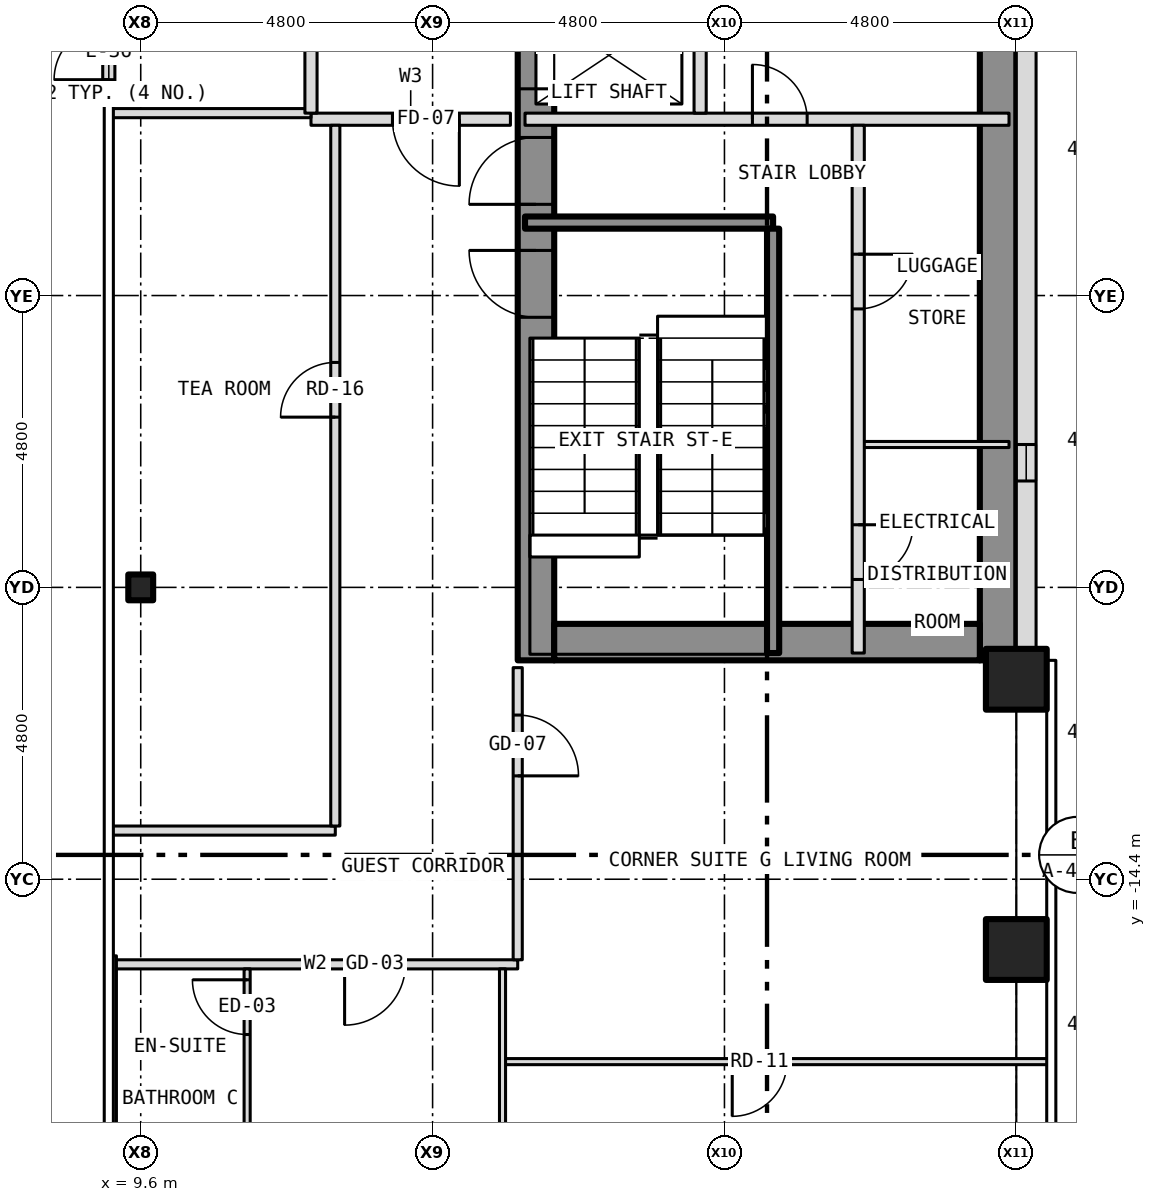
"""IFC4 building model, lengths in metres.
Left out: names, types, materials, properties, quantities, classifications, styles, units other than length and angle.
Written with IfcOpenShell. Run it as: python <this file> out.ifc"""

import sys

from ifc_helpers import new_model, si_unit, direction, frame, frame_2d, origin, origin_2d, place, context, subcontext, project, spatial, rectangle, hollow_rectangle, i_section, extrude, element, fill, save


model = new_model("IFC4")
c1 = context("Model", 3, precision=1e-05, world=origin(), true_north=direction((0.0, 1.0)))
c2 = subcontext(c1, "Body", "Model", "MODEL_VIEW")
j1 = project(units=[si_unit("LENGTHUNIT", "METRE"), si_unit("PLANEANGLEUNIT", "RADIAN")], contexts=[c1])
p1 = place(None, origin())
s1 = spatial("IfcSite", under=j1, at=p1, CompositionType="ELEMENT")
p2 = place(p1, origin())
s2 = spatial("IfcBuilding", under=s1, at=p2, CompositionType="ELEMENT")
p3 = place(p2, frame((0.0, 0.0, 77.5)))
s3 = spatial("IfcBuildingStorey", under=s2, at=p3, CompositionType="ELEMENT", Elevation=77.5)
for number, where, z_axis, x_axis in (
    (1, (24.0, -15.556, -0.15), (0.0, 0.0, 1.0), (1.0, 0.0, 0.0)),
    (2, (24.0, -11.111, -0.15), (0.0, 0.0, 1.0), (1.0, 0.0, 0.0)),
):
    element("IfcColumn", number, at=place(p3, frame(where, z_axis=z_axis, x_axis=x_axis)), inside=s3, PredefinedType="COLUMN", context=c2, shape_type="SweptSolid", body=[
        extrude(hollow_rectangle(XDim=1.0, YDim=1.0, WallThickness=0.06, at=origin_2d()), origin(), (0.0, 0.0, 1.0), 3.5),
    ])
p4 = place(p3, frame((9.6, -9.6, -0.15), z_axis=(0.0, 0.0, 1.0), x_axis=(1.0, 0.0, 0.0)))
e3 = element("IfcColumn", 3, at=p4, inside=s3, PredefinedType="COLUMN", context=c2, shape_type="SweptSolid", body=[
    extrude(i_section(OverallWidth=0.409, OverallDepth=0.424, WebThickness=0.033, FlangeThickness=0.052, at=origin_2d()), origin(), (0.0, 0.0, 1.0), 3.5),
])
p5 = place(p3, frame((16.1, -10.8, 0.0), z_axis=(0.0, 0.0, 1.0), x_axis=(0.0, 1.0, 0.0)))
e4 = element("IfcWall", 4, at=p5, inside=s3, PredefinedType="SHEAR", context=c2, shape_type="SweptSolid", body=[
    extrude(rectangle(XDim=21.6, YDim=0.6, at=frame_2d((10.8, 0.0))), origin(), (0.0, 0.0, 1.0), 3.25),
])
p6 = place(p5, frame((9.4, 0.0, 0.0)))
e5 = element("IfcOpeningElement", 5, at=p6, cuts=e4, PredefinedType="OPENING", context=c2, shape_type="SweptSolid", body=[
    extrude(rectangle(XDim=1.1, YDim=2.1, at=frame_2d((0.55, 1.05))), frame((0.0, 0.312, 0.0), z_axis=(0.0, -1.0, 0.0), x_axis=(1.0, 0.0, 0.0)), (0.0, 0.0, 1.0), 0.624),
])
p7 = place(p5, frame((11.5, 0.0, 0.0)))
e6 = element("IfcOpeningElement", 6, at=p7, cuts=e4, PredefinedType="OPENING", context=c2, shape_type="SweptSolid", body=[
    extrude(rectangle(XDim=1.1, YDim=2.1, at=frame_2d((0.55, 1.05))), frame((0.0, 0.312, 0.0), z_axis=(0.0, -1.0, 0.0), x_axis=(1.0, 0.0, 0.0)), (0.0, 0.0, 1.0), 0.624),
])
p8 = place(p5, frame((13.6, 0.0, 0.0)))
e7 = element("IfcOpeningElement", 7, at=p8, cuts=e4, PredefinedType="OPENING", context=c2, shape_type="SweptSolid", body=[
    extrude(rectangle(XDim=1.1, YDim=2.1, at=frame_2d((0.55, 1.05))), frame((0.0, 0.312, 0.0), z_axis=(0.0, -1.0, 0.0), x_axis=(1.0, 0.0, 0.0)), (0.0, 0.0, 1.0), 0.624),
])
p9 = place(p5, frame((15.7, 0.0, 0.0)))
e8 = element("IfcOpeningElement", 8, at=p9, cuts=e4, PredefinedType="OPENING", context=c2, shape_type="SweptSolid", body=[
    extrude(rectangle(XDim=1.1, YDim=2.1, at=frame_2d((0.55, 1.05))), frame((0.0, 0.312, 0.0), z_axis=(0.0, -1.0, 0.0), x_axis=(1.0, 0.0, 0.0)), (0.0, 0.0, 1.0), 0.624),
])
p10 = place(p5, frame((17.8, 0.0, 0.0)))
e9 = element("IfcOpeningElement", 9, at=p10, cuts=e4, PredefinedType="OPENING", context=c2, shape_type="SweptSolid", body=[
    extrude(rectangle(XDim=1.1, YDim=2.1, at=frame_2d((0.55, 1.05))), frame((0.0, 0.312, 0.0), z_axis=(0.0, -1.0, 0.0), x_axis=(1.0, 0.0, 0.0)), (0.0, 0.0, 1.0), 0.624),
])
p11 = place(p5, frame((5.642, 0.0, 0.0)))
e10 = element("IfcOpeningElement", 10, at=p11, cuts=e4, PredefinedType="OPENING", context=c2, shape_type="SweptSolid", body=[
    extrude(rectangle(XDim=1.1, YDim=2.1, at=frame_2d((0.55, 1.05))), frame((0.0, 0.312, 0.0), z_axis=(0.0, -1.0, 0.0), x_axis=(1.0, 0.0, 0.0)), (0.0, 0.0, 1.0), 0.624),
])
p12 = place(p5, frame((7.5, 0.0, 0.0)))
e11 = element("IfcOpeningElement", 11, at=p12, cuts=e4, PredefinedType="OPENING", context=c2, shape_type="SweptSolid", body=[
    extrude(rectangle(XDim=1.1, YDim=2.1, at=frame_2d((0.55, 1.05))), frame((0.0, 0.312, 0.0), z_axis=(0.0, -1.0, 0.0), x_axis=(1.0, 0.0, 0.0)), (0.0, 0.0, 1.0), 0.624),
])
p13 = place(p3, frame((23.7, -10.8, 0.0), z_axis=(0.0, 0.0, 1.0), x_axis=(0.0, 1.0, 0.0)))
e12 = element("IfcWall", 12, at=p13, inside=s3, PredefinedType="SHEAR", context=c2, shape_type="SweptSolid", body=[
    extrude(rectangle(XDim=21.6, YDim=0.6, at=frame_2d((10.8, 0.0))), origin(), (0.0, 0.0, 1.0), 3.25),
])
p14 = place(p3, frame((16.4, -10.5, 0.0), z_axis=(0.0, 0.0, 1.0), x_axis=(1.0, 0.0, 0.0)))
e13 = element("IfcWall", 13, at=p14, inside=s3, PredefinedType="SHEAR", context=c2, shape_type="SweptSolid", body=[
    extrude(rectangle(XDim=7.0, YDim=0.6, at=frame_2d((3.5, 0.0))), origin(), (0.0, 0.0, 1.0), 3.25),
])
p15 = place(p3, frame((24.163, -10.8, 0.0), z_axis=(0.0, 0.0, 1.0), x_axis=(0.0, 1.0, 0.0)))
e14 = element("IfcWall", 14, at=p15, inside=s3, PredefinedType="SOLIDWALL", context=c2, shape_type="SweptSolid", body=[
    extrude(rectangle(XDim=21.6, YDim=0.325, at=frame_2d((10.8, 0.0))), origin(), (0.0, 0.0, 1.0), 3.5),
])
p16 = place(p15, frame((2.95, 0.0, 1.0)))
e15 = element("IfcOpeningElement", 15, at=p16, cuts=e14, PredefinedType="OPENING", context=c2, shape_type="SweptSolid", body=[
    extrude(rectangle(XDim=0.6, YDim=1.5, at=frame_2d((0.3, 0.75))), frame((0.0, 0.175, 0.0), z_axis=(0.0, -1.0, 0.0), x_axis=(1.0, 0.0, 0.0)), (0.0, 0.0, 1.0), 0.349),
])
p17 = place(p3, frame((9.075, -1.4, 0.0), z_axis=(0.0, 0.0, 1.0), x_axis=(0.0, 1.0, 0.0)))
e16 = element("IfcWall", 16, at=p17, inside=s3, PredefinedType="SOLIDWALL", context=c2, shape_type="SweptSolid", body=[
    extrude(rectangle(XDim=2.8, YDim=0.2, at=frame_2d((1.4, 0.0))), origin(), (0.0, 0.0, 1.0), 3.5),
])
p18 = place(p17, frame((0.15, 0.0, 0.0)))
e17 = element("IfcOpeningElement", 17, at=p18, cuts=e16, PredefinedType="OPENING", context=c2, shape_type="SweptSolid", body=[
    extrude(rectangle(XDim=0.9, YDim=2.1, at=frame_2d((0.45, 1.05))), frame((0.0, 0.112, 0.0), z_axis=(0.0, -1.0, 0.0), x_axis=(1.0, 0.0, 0.0)), (0.0, 0.0, 1.0), 0.224),
])
p19 = place(p17, frame((1.75, 0.0, 0.0)))
e18 = element("IfcOpeningElement", 18, at=p19, cuts=e16, PredefinedType="OPENING", context=c2, shape_type="SweptSolid", body=[
    extrude(rectangle(XDim=0.9, YDim=2.1, at=frame_2d((0.45, 1.05))), frame((0.0, 0.112, 0.0), z_axis=(0.0, -1.0, 0.0), x_axis=(1.0, 0.0, 0.0)), (0.0, 0.0, 1.0), 0.224),
])
p20 = place(p3, frame((15.55, -17.4, 0.0), z_axis=(0.0, 0.0, 1.0), x_axis=(1.0, 0.0, 0.0)))
e19 = element("IfcWall", 19, at=p20, inside=s3, PredefinedType="PARTITIONING", context=c2, shape_type="SweptSolid", body=[
    extrude(rectangle(XDim=8.98, YDim=0.1, at=frame_2d((4.49, 0.0))), origin(), (0.0, 0.0, 1.0), 3.35),
])
p21 = place(p20, frame((3.778, 0.0, 0.0)))
e20 = element("IfcOpeningElement", 20, at=p21, cuts=e19, PredefinedType="OPENING", context=c2, shape_type="SweptSolid", body=[
    extrude(rectangle(XDim=0.9, YDim=2.1, at=frame_2d((0.45, 1.05))), frame((0.0, 0.062, 0.0), z_axis=(0.0, -1.0, 0.0), x_axis=(1.0, 0.0, 0.0)), (0.0, 0.0, 1.0), 0.124),
])
p22 = place(p3, frame((9.15, -15.8, 0.0), z_axis=(0.0, 0.0, 1.0), x_axis=(1.0, 0.0, 0.0)))
e21 = element("IfcWall", 21, at=p22, inside=s3, PredefinedType="PARTITIONING", context=c2, shape_type="SweptSolid", body=[
    extrude(rectangle(XDim=6.65, YDim=0.15, at=frame_2d((3.325, 0.0))), origin(), (0.0, 0.0, 1.0), 3.35),
])
p23 = place(p22, frame((3.803, 0.0, 0.0)))
e22 = element("IfcOpeningElement", 22, at=p23, cuts=e21, PredefinedType="OPENING", context=c2, shape_type="SweptSolid", body=[
    extrude(rectangle(XDim=1.0, YDim=2.1, at=frame_2d((0.5, 1.05))), frame((0.0, 0.087, 0.0), z_axis=(0.0, -1.0, 0.0), x_axis=(1.0, 0.0, 0.0)), (0.0, 0.0, 1.0), 0.174),
])
p24 = place(p3, frame((9.12, -13.6, 0.0), z_axis=(0.0, 0.0, 1.0), x_axis=(1.0, 0.0, 0.0)))
e23 = element("IfcWall", 23, at=p24, inside=s3, PredefinedType="PARTITIONING", context=c2, shape_type="SweptSolid", body=[
    extrude(rectangle(XDim=3.68, YDim=0.15, at=frame_2d((1.84, 0.0))), origin(), (0.0, 0.0, 1.0), 3.35),
])
p25 = place(p3, frame((21.4, -7.25, 0.0), z_axis=(0.0, 0.0, 1.0), x_axis=(1.0, 0.0, 0.0)))
e24 = element("IfcWall", 24, at=p25, inside=s3, PredefinedType="PARTITIONING", context=c2, shape_type="SweptSolid", body=[
    extrude(rectangle(XDim=2.48, YDim=0.1, at=frame_2d((1.24, 0.0))), origin(), (0.0, 0.0, 1.0), 3.25),
])
p26 = place(p3, frame((15.92, -3.6, 0.0), z_axis=(0.0, 0.0, 1.0), x_axis=(1.0, 0.0, 0.0)))
e25 = element("IfcWall", 25, at=p26, inside=s3, PredefinedType="SHEAR", context=c2, shape_type="SweptSolid", body=[
    extrude(rectangle(XDim=4.08, YDim=0.2, at=frame_2d((2.04, 0.0))), origin(), (0.0, 0.0, 1.0), 3.25),
])
p27 = place(p3, frame((12.4, -1.9, 0.0), z_axis=(0.0, 0.0, 1.0), x_axis=(1.0, 0.0, 0.0)))
e26 = element("IfcWall", 26, at=p27, inside=s3, PredefinedType="PARTITIONING", context=c2, shape_type="SweptSolid", body=[
    extrude(rectangle(XDim=3.28, YDim=0.2, at=frame_2d((1.64, 0.0))), origin(), (0.0, 0.0, 1.0), 3.35),
])
p28 = place(p27, frame((1.34, 0.0, 0.0)))
e27 = element("IfcOpeningElement", 27, at=p28, cuts=e26, PredefinedType="OPENING", context=c2, shape_type="SweptSolid", body=[
    extrude(rectangle(XDim=1.1, YDim=2.1, at=frame_2d((0.55, 1.05))), frame((0.0, 0.112, 0.0), z_axis=(0.0, -1.0, 0.0), x_axis=(1.0, 0.0, 0.0)), (0.0, 0.0, 1.0), 0.224),
])
p29 = place(p3, frame((15.92, -1.9, 0.0), z_axis=(0.0, 0.0, 1.0), x_axis=(1.0, 0.0, 0.0)))
e28 = element("IfcWall", 28, at=p29, inside=s3, PredefinedType="PARTITIONING", context=c2, shape_type="SweptSolid", body=[
    extrude(rectangle(XDim=7.96, YDim=0.2, at=frame_2d((3.98, 0.0))), origin(), (0.0, 0.0, 1.0), 3.25),
])
p30 = place(p29, frame((3.74, 0.0, 0.0)))
e29 = element("IfcOpeningElement", 29, at=p30, cuts=e28, PredefinedType="OPENING", context=c2, shape_type="SweptSolid", body=[
    extrude(rectangle(XDim=0.9, YDim=2.1, at=frame_2d((0.45, 1.05))), frame((0.0, 0.112, 0.0), z_axis=(0.0, -1.0, 0.0), x_axis=(1.0, 0.0, 0.0)), (0.0, 0.0, 1.0), 0.224),
])
p31 = place(p3, frame((9.12, -1.8, 0.0), z_axis=(0.0, 0.0, 1.0), x_axis=(1.0, 0.0, 0.0)))
e30 = element("IfcWall", 30, at=p31, inside=s3, PredefinedType="PARTITIONING", context=c2, shape_type="SweptSolid", body=[
    extrude(rectangle(XDim=3.28, YDim=0.15, at=frame_2d((1.64, 0.0))), origin(), (0.0, 0.0, 1.0), 3.35),
])
p32 = place(p3, frame((9.15, -19.14, 0.0), z_axis=(0.0, 0.0, 1.0), x_axis=(0.0, 1.0, 0.0)))
e31 = element("IfcWall", 31, at=p32, inside=s3, PredefinedType="PARTITIONING", context=c2, shape_type="SweptSolid", body=[
    extrude(rectangle(XDim=3.48, YDim=0.1, at=frame_2d((1.74, 0.0))), origin(), (0.0, 0.0, 1.0), 2.733),
])
p33 = place(p3, frame((11.35, -18.95, 0.0), z_axis=(0.0, 0.0, 1.0), x_axis=(0.0, 1.0, 0.0)))
e32 = element("IfcWall", 32, at=p33, inside=s3, PredefinedType="PARTITIONING", context=c2, shape_type="SweptSolid", body=[
    extrude(rectangle(XDim=3.075, YDim=0.1, at=frame_2d((1.538, 0.0))), origin(), (0.0, 0.0, 1.0), 3.35),
])
p34 = place(p33, frame((1.996, 0.0, 0.0)))
e33 = element("IfcOpeningElement", 33, at=p34, cuts=e32, PredefinedType="OPENING", context=c2, shape_type="SweptSolid", body=[
    extrude(rectangle(XDim=0.9, YDim=2.1, at=frame_2d((0.45, 1.05))), frame((0.0, 0.062, 0.0), z_axis=(0.0, -1.0, 0.0), x_axis=(1.0, 0.0, 0.0)), (0.0, 0.0, 1.0), 0.124),
])
p35 = place(p3, frame((12.4, -1.8, 0.0), z_axis=(0.0, 0.0, 1.0), x_axis=(0.0, 1.0, 0.0)))
e34 = element("IfcWall", 34, at=p35, inside=s3, PredefinedType="PARTITIONING", context=c2, shape_type="SweptSolid", body=[
    extrude(rectangle(XDim=4.0, YDim=0.2, at=frame_2d((2.0, 0.0))), origin(), (0.0, 0.0, 1.0), 3.35),
])
p36 = place(p35, frame((1.25, 0.0, 0.0)))
e35 = element("IfcOpeningElement", 35, at=p36, cuts=e34, PredefinedType="OPENING", context=c2, shape_type="SweptSolid", body=[
    extrude(rectangle(XDim=1.1, YDim=2.1, at=frame_2d((0.55, 1.05))), frame((0.0, 0.112, 0.0), z_axis=(0.0, -1.0, 0.0), x_axis=(1.0, 0.0, 0.0)), (0.0, 0.0, 1.0), 0.224),
])
p37 = place(p3, frame((12.8, -13.525, 0.0), z_axis=(0.0, 0.0, 1.0), x_axis=(0.0, 1.0, 0.0)))
e36 = element("IfcWall", 36, at=p37, inside=s3, PredefinedType="PARTITIONING", context=c2, shape_type="SweptSolid", body=[
    extrude(rectangle(XDim=11.525, YDim=0.15, at=frame_2d((5.762, 0.0))), origin(), (0.0, 0.0, 1.0), 3.35),
])
p38 = place(p37, frame((6.725, 0.0, 0.0)))
e37 = element("IfcOpeningElement", 37, at=p38, cuts=e36, PredefinedType="OPENING", context=c2, shape_type="SweptSolid", body=[
    extrude(rectangle(XDim=0.9, YDim=2.1, at=frame_2d((0.45, 1.05))), frame((0.0, 0.087, 0.0), z_axis=(0.0, -1.0, 0.0), x_axis=(1.0, 0.0, 0.0)), (0.0, 0.0, 1.0), 0.174),
])
p39 = place(p3, frame((15.55, -23.88, 0.0), z_axis=(0.0, 0.0, 1.0), x_axis=(0.0, 1.0, 0.0)))
e38 = element("IfcWall", 38, at=p39, inside=s3, PredefinedType="PARTITIONING", context=c2, shape_type="SweptSolid", body=[
    extrude(rectangle(XDim=8.005, YDim=0.1, at=frame_2d((4.002, 0.0))), origin(), (0.0, 0.0, 1.0), 3.35),
])
p40 = place(p3, frame((15.8, -15.725, 0.0), z_axis=(0.0, 0.0, 1.0), x_axis=(0.0, 1.0, 0.0)))
e39 = element("IfcWall", 39, at=p40, inside=s3, PredefinedType="PARTITIONING", context=c2, shape_type="SweptSolid", body=[
    extrude(rectangle(XDim=4.805, YDim=0.15, at=frame_2d((2.403, 0.0))), origin(), (0.0, 0.0, 1.0), 3.35),
])
p41 = place(p40, frame((3.025, 0.0, 0.0)))
e40 = element("IfcOpeningElement", 40, at=p41, cuts=e39, PredefinedType="OPENING", context=c2, shape_type="SweptSolid", body=[
    extrude(rectangle(XDim=1.0, YDim=2.1, at=frame_2d((0.5, 1.05))), frame((0.0, 0.087, 0.0), z_axis=(0.0, -1.0, 0.0), x_axis=(1.0, 0.0, 0.0)), (0.0, 0.0, 1.0), 0.174),
])
p42 = place(p3, frame((18.8, -1.8, 0.0), z_axis=(0.0, 0.0, 1.0), x_axis=(0.0, 1.0, 0.0)))
e41 = element("IfcWall", 41, at=p42, inside=s3, PredefinedType="PARTITIONING", context=c2, shape_type="SweptSolid", body=[
    extrude(rectangle(XDim=12.48, YDim=0.2, at=frame_2d((6.24, 0.0))), origin(), (0.0, 0.0, 1.0), 3.25),
])
p43 = place(p3, frame((20.0, -10.68, 0.0), z_axis=(0.0, 0.0, 1.0), x_axis=(0.0, 1.0, 0.0)))
e42 = element("IfcWall", 42, at=p43, inside=s3, PredefinedType="SHEAR", context=c2, shape_type="SweptSolid", body=[
    extrude(rectangle(XDim=6.98, YDim=0.2, at=frame_2d((3.49, 0.0))), origin(), (0.0, 0.0, 1.0), 3.25),
])
p44 = place(p3, frame((21.4, -10.68, 0.0), z_axis=(0.0, 0.0, 1.0), x_axis=(0.0, 1.0, 0.0)))
e43 = element("IfcWall", 43, at=p44, inside=s3, PredefinedType="PARTITIONING", context=c2, shape_type="SweptSolid", body=[
    extrude(rectangle(XDim=8.68, YDim=0.2, at=frame_2d((4.34, 0.0))), origin(), (0.0, 0.0, 1.0), 3.25),
])
p45 = place(p44, frame((1.21, 0.0, 0.0)))
e44 = element("IfcOpeningElement", 44, at=p45, cuts=e43, PredefinedType="OPENING", context=c2, shape_type="SweptSolid", body=[
    extrude(rectangle(XDim=0.9, YDim=2.1, at=frame_2d((0.45, 1.05))), frame((0.0, 0.112, 0.0), z_axis=(0.0, -1.0, 0.0), x_axis=(1.0, 0.0, 0.0)), (0.0, 0.0, 1.0), 0.224),
])
p46 = place(p44, frame((5.66, 0.0, 0.0)))
e45 = element("IfcOpeningElement", 45, at=p46, cuts=e43, PredefinedType="OPENING", context=c2, shape_type="SweptSolid", body=[
    extrude(rectangle(XDim=0.9, YDim=2.1, at=frame_2d((0.45, 1.05))), frame((0.0, 0.112, 0.0), z_axis=(0.0, -1.0, 0.0), x_axis=(1.0, 0.0, 0.0)), (0.0, 0.0, 1.0), 0.224),
])
p47 = place(p16, origin())
e46 = element("IfcWindow", 46, at=p47, inside=s3, PartitioningType="SINGLE_PANEL", PredefinedType="WINDOW", context=c2, shape_type="SweptSolid", body=[
    extrude(rectangle(XDim=0.6, YDim=1.5, at=frame_2d((0.3, 0.75))), frame((0.0, -0.073, 0.0), z_axis=(0.0, -1.0, 0.0), x_axis=(1.0, 0.0, 0.0)), (0.0, 0.0, 1.0), 0.06),
])
fill(e15, e46)
p48 = place(p18, origin())
e47 = element("IfcDoor", 47, at=p48, inside=s3, OperationType="SINGLE_SWING_LEFT", PredefinedType="DOOR", context=c2, shape_type="SweptSolid", body=[
    extrude(rectangle(XDim=0.9, YDim=2.1, at=frame_2d((0.45, 1.05))), frame((0.0, 0.025, 0.0), z_axis=(0.0, -1.0, 0.0), x_axis=(1.0, 0.0, 0.0)), (0.0, 0.0, 1.0), 0.05),
])
fill(e17, e47)
p49 = place(p6, origin())
e48 = element("IfcDoor", 48, at=p49, inside=s3, OperationType="SLIDING_TO_LEFT", PredefinedType="DOOR", context=c2, shape_type="SweptSolid", body=[
    extrude(rectangle(XDim=1.1, YDim=2.1, at=frame_2d((0.55, 1.05))), frame((0.0, 0.025, 0.0), z_axis=(0.0, -1.0, 0.0), x_axis=(1.0, 0.0, 0.0)), (0.0, 0.0, 1.0), 0.05),
])
fill(e5, e48)
p50 = place(p11, origin())
e49 = element("IfcDoor", 49, at=p50, inside=s3, OperationType="SINGLE_SWING_RIGHT", PredefinedType="DOOR", context=c2, shape_type="SweptSolid", body=[
    extrude(rectangle(XDim=1.1, YDim=2.1, at=frame_2d((0.55, 1.05))), frame((0.0, 0.025, 0.0), z_axis=(0.0, -1.0, 0.0), x_axis=(1.0, 0.0, 0.0)), (0.0, 0.0, 1.0), 0.05),
])
fill(e10, e49)
p51 = place(p12, origin())
e50 = element("IfcDoor", 50, at=p51, inside=s3, OperationType="SINGLE_SWING_LEFT", PredefinedType="DOOR", context=c2, shape_type="SweptSolid", body=[
    extrude(rectangle(XDim=1.1, YDim=2.1, at=frame_2d((0.55, 1.05))), frame((0.0, 0.025, 0.0), z_axis=(0.0, -1.0, 0.0), x_axis=(1.0, 0.0, 0.0)), (0.0, 0.0, 1.0), 0.05),
])
fill(e11, e50)
p52 = place(p45, origin())
e51 = element("IfcDoor", 51, at=p52, inside=s3, OperationType="SINGLE_SWING_RIGHT", PredefinedType="DOOR", context=c2, shape_type="SweptSolid", body=[
    extrude(rectangle(XDim=0.9, YDim=2.1, at=frame_2d((0.45, 1.05))), frame((0.0, 0.025, 0.0), z_axis=(0.0, -1.0, 0.0), x_axis=(1.0, 0.0, 0.0)), (0.0, 0.0, 1.0), 0.05),
])
fill(e44, e51)
p53 = place(p46, origin())
e52 = element("IfcDoor", 52, at=p53, inside=s3, OperationType="SINGLE_SWING_RIGHT", PredefinedType="DOOR", context=c2, shape_type="SweptSolid", body=[
    extrude(rectangle(XDim=0.9, YDim=2.1, at=frame_2d((0.45, 1.05))), frame((0.0, 0.025, 0.0), z_axis=(0.0, -1.0, 0.0), x_axis=(1.0, 0.0, 0.0)), (0.0, 0.0, 1.0), 0.05),
])
fill(e45, e52)
p54 = place(p30, origin())
e53 = element("IfcDoor", 53, at=p54, inside=s3, OperationType="SINGLE_SWING_LEFT", PredefinedType="DOOR", context=c2, shape_type="SweptSolid", body=[
    extrude(rectangle(XDim=0.9, YDim=2.1, at=frame_2d((0.45, 1.05))), frame((0.0, 0.025, 0.0), z_axis=(0.0, -1.0, 0.0), x_axis=(1.0, 0.0, 0.0)), (0.0, 0.0, 1.0), 0.05),
])
fill(e29, e53)
p55 = place(p28, origin())
e54 = element("IfcDoor", 54, at=p55, inside=s3, OperationType="SINGLE_SWING_RIGHT", PredefinedType="DOOR", context=c2, shape_type="SweptSolid", body=[
    extrude(rectangle(XDim=1.1, YDim=2.1, at=frame_2d((0.55, 1.05))), frame((0.0, 0.025, 0.0), z_axis=(0.0, -1.0, 0.0), x_axis=(1.0, 0.0, 0.0)), (0.0, 0.0, 1.0), 0.05),
])
fill(e27, e54)
p56 = place(p23, origin())
e55 = element("IfcDoor", 55, at=p56, inside=s3, OperationType="SINGLE_SWING_LEFT", PredefinedType="DOOR", context=c2, shape_type="SweptSolid", body=[
    extrude(rectangle(XDim=1.0, YDim=2.1, at=frame_2d((0.5, 1.05))), frame((0.0, 0.025, 0.0), z_axis=(0.0, -1.0, 0.0), x_axis=(1.0, 0.0, 0.0)), (0.0, 0.0, 1.0), 0.05),
])
fill(e22, e55)
p57 = place(p34, origin())
e56 = element("IfcDoor", 56, at=p57, inside=s3, OperationType="SINGLE_SWING_RIGHT", PredefinedType="DOOR", context=c2, shape_type="SweptSolid", body=[
    extrude(rectangle(XDim=0.9, YDim=2.1, at=frame_2d((0.45, 1.05))), frame((0.0, 0.025, 0.0), z_axis=(0.0, -1.0, 0.0), x_axis=(1.0, 0.0, 0.0)), (0.0, 0.0, 1.0), 0.05),
])
fill(e33, e56)
p58 = place(p41, origin())
e57 = element("IfcDoor", 57, at=p58, inside=s3, OperationType="SINGLE_SWING_LEFT", PredefinedType="DOOR", context=c2, shape_type="SweptSolid", body=[
    extrude(rectangle(XDim=1.0, YDim=2.1, at=frame_2d((0.5, 1.05))), frame((0.0, 0.025, 0.0), z_axis=(0.0, -1.0, 0.0), x_axis=(1.0, 0.0, 0.0)), (0.0, 0.0, 1.0), 0.05),
])
fill(e40, e57)
p59 = place(p21, origin())
e58 = element("IfcDoor", 58, at=p59, inside=s3, OperationType="SINGLE_SWING_LEFT", PredefinedType="DOOR", context=c2, shape_type="SweptSolid", body=[
    extrude(rectangle(XDim=0.9, YDim=2.1, at=frame_2d((0.45, 1.05))), frame((0.0, 0.025, 0.0), z_axis=(0.0, -1.0, 0.0), x_axis=(1.0, 0.0, 0.0)), (0.0, 0.0, 1.0), 0.05),
])
fill(e20, e58)
p60 = place(p38, origin())
e59 = element("IfcDoor", 59, at=p60, inside=s3, OperationType="SINGLE_SWING_LEFT", PredefinedType="DOOR", context=c2, shape_type="SweptSolid", body=[
    extrude(rectangle(XDim=0.9, YDim=2.1, at=frame_2d((0.45, 1.05))), frame((0.0, 0.025, 0.0), z_axis=(0.0, -1.0, 0.0), x_axis=(1.0, 0.0, 0.0)), (0.0, 0.0, 1.0), 0.05),
])
fill(e37, e59)
save(model, sys.argv[1])
